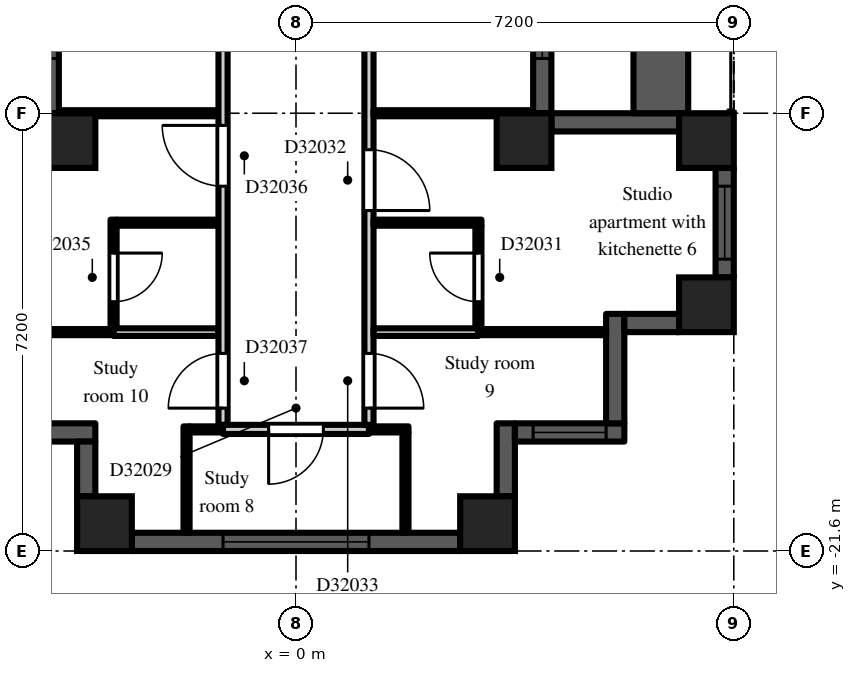
"""IFC4 building model, lengths in metres.
Left out: names, types, materials, properties, quantities, classifications, styles, units other than length and angle.
Written with IfcOpenShell. Run it as: python <this file> out.ifc"""

import sys

from ifc_helpers import new_model, si_unit, direction, frame, frame_2d, origin, origin_2d, place, context, subcontext, project, spatial, rectangle, extrude, element, fill, save


model = new_model("IFC4")
c1 = context("Model", 3, precision=1e-05, world=origin(), true_north=direction((0.0, 1.0)))
c2 = subcontext(c1, "Body", "Model", "MODEL_VIEW")
j1 = project(units=[si_unit("LENGTHUNIT", "METRE"), si_unit("PLANEANGLEUNIT", "RADIAN")], contexts=[c1])
p1 = place(None, origin())
s1 = spatial("IfcSite", under=j1, at=p1, CompositionType="ELEMENT")
p2 = place(p1, origin())
s2 = spatial("IfcBuilding", under=s1, at=p2, CompositionType="ELEMENT")
p3 = place(p2, frame((0.0, 0.0, 225.9)))
s3 = spatial("IfcBuildingStorey", under=s2, at=p3, CompositionType="ELEMENT", Elevation=225.9)
for number, where, z_axis, x_axis in (
    (1, (-3.75, -14.85, 0.0), (0.0, 0.0, 1.0), (1.0, 0.0, 0.0)),
    (2, (-3.15, -21.15, 0.0), (0.0, 0.0, 1.0), (1.0, 0.0, 0.0)),
    (3, (3.15, -21.15, 0.0), (0.0, 0.0, 1.0), (1.0, 0.0, 0.0)),
    (4, (3.75, -14.85, 0.0), (0.0, 0.0, 1.0), (1.0, 0.0, 0.0)),
    (5, (6.75, -17.55, 0.0), (0.0, 0.0, 1.0), (1.0, 0.0, 0.0)),
    (6, (6.75, -14.85, 0.0), (0.0, 0.0, 1.0), (1.0, 0.0, 0.0)),
):
    element("IfcColumn", number, at=place(p3, frame(where, z_axis=z_axis, x_axis=x_axis)), inside=s3, PredefinedType="COLUMN", context=c2, shape_type="SweptSolid", body=[
        extrude(rectangle(XDim=0.9, YDim=0.9, at=origin_2d()), origin(), (0.0, 0.0, 1.0), 3.0),
    ])
p4 = place(p3, frame((-4.05, -7.2, 0.0), z_axis=(0.0, 0.0, 1.0), x_axis=(0.0, -1.0, 0.0)))
e7 = element("IfcWall", 7, at=p4, inside=s3, PredefinedType="SOLIDWALL", context=c2, shape_type="SweptSolid", body=[
    extrude(rectangle(XDim=7.2, YDim=0.3, at=frame_2d((3.6, 0.0))), origin(), (0.0, 0.0, 1.0), 2.3),
])
p5 = place(p4, frame((3.0, 0.0, 0.0)))
e8 = element("IfcOpeningElement", 8, at=p5, cuts=e7, PredefinedType="OPENING", context=c2, shape_type="SweptSolid", body=[
    extrude(rectangle(XDim=1.2, YDim=2.05, at=frame_2d((0.6, 1.025))), frame((0.0, 0.16, 0.0), z_axis=(0.0, -1.0, 0.0), x_axis=(1.0, 0.0, 0.0)), (0.0, 0.0, 1.0), 0.32),
])
p6 = place(p4, frame((0.9, 0.0, 0.2)))
e9 = element("IfcOpeningElement", 9, at=p6, cuts=e7, PredefinedType="OPENING", context=c2, shape_type="SweptSolid", body=[
    extrude(rectangle(XDim=1.8, YDim=1.85, at=frame_2d((0.9, 0.925))), frame((0.0, 0.16, 0.0), z_axis=(0.0, -1.0, 0.0), x_axis=(1.0, 0.0, 0.0)), (0.0, 0.0, 1.0), 0.32),
])
p7 = place(p4, frame((4.5, 0.0, 0.2)))
e10 = element("IfcOpeningElement", 10, at=p7, cuts=e7, PredefinedType="OPENING", context=c2, shape_type="SweptSolid", body=[
    extrude(rectangle(XDim=1.8, YDim=1.85, at=frame_2d((0.9, 0.925))), frame((0.0, 0.16, 0.0), z_axis=(0.0, -1.0, 0.0), x_axis=(1.0, 0.0, 0.0)), (0.0, 0.0, 1.0), 0.32),
])
p8 = place(p3, frame((-5.1, -19.65, 0.0), z_axis=(0.0, 0.0, 1.0), x_axis=(1.0, 0.0, 0.0)))
e11 = element("IfcWall", 11, at=p8, inside=s3, PredefinedType="SOLIDWALL", context=c2, shape_type="SweptSolid", body=[
    extrude(rectangle(XDim=1.8, YDim=0.3, at=frame_2d((0.9, 0.0))), origin(), (0.0, 0.0, 1.0), 2.6),
])
p9 = place(p3, frame((-3.45, -19.8, 0.0), z_axis=(0.0, 0.0, 1.0), x_axis=(0.0, -1.0, 0.0)))
e12 = element("IfcWall", 12, at=p9, inside=s3, PredefinedType="SOLIDWALL", context=c2, shape_type="SweptSolid", body=[
    extrude(rectangle(XDim=0.9, YDim=0.3, at=frame_2d((0.45, 0.0))), origin(), (0.0, 0.0, 1.0), 2.6),
])
p10 = place(p3, frame((-2.7, -21.45, 0.0), z_axis=(0.0, 0.0, 1.0), x_axis=(1.0, 0.0, 0.0)))
e13 = element("IfcWall", 13, at=p10, inside=s3, PredefinedType="SOLIDWALL", context=c2, shape_type="SweptSolid", body=[
    extrude(rectangle(XDim=5.4, YDim=0.3, at=frame_2d((2.7, 0.0))), origin(), (0.0, 0.0, 1.0), 2.3),
])
p11 = place(p10, frame((1.5, 0.0, 0.2)))
e14 = element("IfcOpeningElement", 14, at=p11, cuts=e13, PredefinedType="OPENING", context=c2, shape_type="SweptSolid", body=[
    extrude(rectangle(XDim=2.4, YDim=1.85, at=frame_2d((1.2, 0.925))), frame((0.0, 0.16, 0.0), z_axis=(0.0, -1.0, 0.0), x_axis=(1.0, 0.0, 0.0)), (0.0, 0.0, 1.0), 0.32),
])
p12 = place(p3, frame((3.45, -20.7, 0.0), z_axis=(0.0, 0.0, 1.0), x_axis=(0.0, 1.0, 0.0)))
e15 = element("IfcWall", 15, at=p12, inside=s3, PredefinedType="SOLIDWALL", context=c2, shape_type="SweptSolid", body=[
    extrude(rectangle(XDim=1.2, YDim=0.3, at=frame_2d((0.6, 0.0))), origin(), (0.0, 0.0, 1.0), 2.6),
])
p13 = place(p3, frame((3.6, -19.65, 0.0), z_axis=(0.0, 0.0, 1.0), x_axis=(1.0, 0.0, 0.0)))
e16 = element("IfcWall", 16, at=p13, inside=s3, PredefinedType="SOLIDWALL", context=c2, shape_type="SweptSolid", body=[
    extrude(rectangle(XDim=1.8, YDim=0.3, at=frame_2d((0.9, 0.0))), origin(), (0.0, 0.0, 1.0), 2.6),
])
p14 = place(p13, frame((0.3, 0.0, 0.2)))
e17 = element("IfcOpeningElement", 17, at=p14, cuts=e16, PredefinedType="OPENING", context=c2, shape_type="SweptSolid", body=[
    extrude(rectangle(XDim=1.2, YDim=1.85, at=frame_2d((0.6, 0.925))), frame((0.0, 0.16, 0.0), z_axis=(0.0, -1.0, 0.0), x_axis=(1.0, 0.0, 0.0)), (0.0, 0.0, 1.0), 0.32),
])
p15 = place(p3, frame((5.25, -19.5, 0.0), z_axis=(0.0, 0.0, 1.0), x_axis=(0.0, 1.0, 0.0)))
e18 = element("IfcWall", 18, at=p15, inside=s3, PredefinedType="SOLIDWALL", context=c2, shape_type="SweptSolid", body=[
    extrude(rectangle(XDim=1.8, YDim=0.3, at=frame_2d((0.9, 0.0))), origin(), (0.0, 0.0, 1.0), 2.6),
])
p16 = place(p3, frame((5.4, -17.85, 0.0), z_axis=(0.0, 0.0, 1.0), x_axis=(1.0, 0.0, 0.0)))
e19 = element("IfcWall", 19, at=p16, inside=s3, PredefinedType="SOLIDWALL", context=c2, shape_type="SweptSolid", body=[
    extrude(rectangle(XDim=0.9, YDim=0.3, at=frame_2d((0.45, 0.0))), origin(), (0.0, 0.0, 1.0), 2.6),
])
p17 = place(p3, frame((7.05, -17.1, 0.0), z_axis=(0.0, 0.0, 1.0), x_axis=(0.0, 1.0, 0.0)))
e20 = element("IfcWall", 20, at=p17, inside=s3, PredefinedType="SOLIDWALL", context=c2, shape_type="SweptSolid", body=[
    extrude(rectangle(XDim=1.8, YDim=0.3, at=frame_2d((0.9, 0.0))), origin(), (0.0, 0.0, 1.0), 2.3),
])
p18 = place(p17, frame((0.3, 0.0, 0.2)))
e21 = element("IfcOpeningElement", 21, at=p18, cuts=e20, PredefinedType="OPENING", context=c2, shape_type="SweptSolid", body=[
    extrude(rectangle(XDim=1.2, YDim=1.85, at=frame_2d((0.6, 0.925))), frame((0.0, 0.16, 0.0), z_axis=(0.0, -1.0, 0.0), x_axis=(1.0, 0.0, 0.0)), (0.0, 0.0, 1.0), 0.32),
])
p19 = place(p3, frame((6.3, -14.55, 0.0), z_axis=(0.0, 0.0, 1.0), x_axis=(-1.0, 0.0, 0.0)))
e22 = element("IfcWall", 22, at=p19, inside=s3, PredefinedType="SOLIDWALL", context=c2, shape_type="SweptSolid", body=[
    extrude(rectangle(XDim=2.1, YDim=0.3, at=frame_2d((1.05, 0.0))), origin(), (0.0, 0.0, 1.0), 2.3),
])
p20 = place(p3, frame((4.05, -14.4, 0.0), z_axis=(0.0, 0.0, 1.0), x_axis=(0.0, 1.0, 0.0)))
e23 = element("IfcWall", 23, at=p20, inside=s3, PredefinedType="SOLIDWALL", context=c2, shape_type="SweptSolid", body=[
    extrude(rectangle(XDim=7.2, YDim=0.3, at=frame_2d((3.6, 0.0))), origin(), (0.0, 0.0, 1.0), 2.3),
])
p21 = place(p20, frame((3.0, 0.0, 0.0)))
e24 = element("IfcOpeningElement", 24, at=p21, cuts=e23, PredefinedType="OPENING", context=c2, shape_type="SweptSolid", body=[
    extrude(rectangle(XDim=1.2, YDim=2.05, at=frame_2d((0.6, 1.025))), frame((0.0, 0.16, 0.0), z_axis=(0.0, -1.0, 0.0), x_axis=(1.0, 0.0, 0.0)), (0.0, 0.0, 1.0), 0.32),
])
p22 = place(p20, frame((0.9, 0.0, 0.2)))
e25 = element("IfcOpeningElement", 25, at=p22, cuts=e23, PredefinedType="OPENING", context=c2, shape_type="SweptSolid", body=[
    extrude(rectangle(XDim=1.8, YDim=1.85, at=frame_2d((0.9, 0.925))), frame((0.0, 0.16, 0.0), z_axis=(0.0, -1.0, 0.0), x_axis=(1.0, 0.0, 0.0)), (0.0, 0.0, 1.0), 0.32),
])
p23 = place(p20, frame((4.5, 0.0, 0.2)))
e26 = element("IfcOpeningElement", 26, at=p23, cuts=e23, PredefinedType="OPENING", context=c2, shape_type="SweptSolid", body=[
    extrude(rectangle(XDim=1.8, YDim=1.85, at=frame_2d((0.9, 0.925))), frame((0.0, 0.16, 0.0), z_axis=(0.0, -1.0, 0.0), x_axis=(1.0, 0.0, 0.0)), (0.0, 0.0, 1.0), 0.32),
])
p24 = place(p3, frame((6.0, -14.4, 0.0), z_axis=(0.0, 0.0, 1.0), x_axis=(0.0, 1.0, 0.0)))
e27 = element("IfcWall", 27, at=p24, inside=s3, PredefinedType="PARAPET", context=c2, shape_type="SweptSolid", body=[
    extrude(rectangle(XDim=7.2, YDim=0.9, at=frame_2d((3.6, 0.0))), origin(), (0.0, 0.0, 1.0), 0.8),
])
p25 = place(p3, frame((-5.1, -18.0, 0.0), z_axis=(0.0, 0.0, 1.0), x_axis=(1.0, 0.0, 0.0)))
e28 = element("IfcWall", 28, at=p25, inside=s3, PredefinedType="PARTITIONING", context=c2, shape_type="SweptSolid", body=[
    extrude(rectangle(XDim=2.1, YDim=0.1, at=frame_2d((1.05, 0.0))), origin(), (0.0, 0.0, 1.0), 2.6),
])
p26 = place(p3, frame((-3.9, -14.4, 0.0), z_axis=(0.0, 0.0, 1.0), x_axis=(1.0, 0.0, 0.0)))
e29 = element("IfcWall", 29, at=p26, inside=s3, PredefinedType="PARTITIONING", context=c2, shape_type="SweptSolid", body=[
    extrude(rectangle(XDim=2.625, YDim=0.1, at=frame_2d((1.312, 0.0))), origin(), (0.0, 0.0, 1.0), 2.6),
])
p27 = place(p3, frame((-3.0, -17.938, 0.0), z_axis=(0.0, 0.0, 1.0), x_axis=(0.0, 1.0, 0.0)))
e30 = element("IfcWall", 30, at=p27, inside=s3, PredefinedType="PARTITIONING", context=c2, shape_type="SweptSolid", body=[
    extrude(rectangle(XDim=1.788, YDim=0.1, at=frame_2d((0.894, 0.0))), origin(), (0.0, 0.0, 1.0), 2.6),
])
p28 = place(p27, frame((0.438, 0.0, 0.0)))
e31 = element("IfcOpeningElement", 31, at=p28, cuts=e30, PredefinedType="OPENING", context=c2, shape_type="SweptSolid", body=[
    extrude(rectangle(XDim=0.8, YDim=2.1, at=frame_2d((0.4, 1.05))), frame((0.0, 0.06, 0.0), z_axis=(0.0, -1.0, 0.0), x_axis=(1.0, 0.0, 0.0)), (0.0, 0.0, 1.0), 0.12),
])
p29 = place(p3, frame((-3.0, -18.0, 0.0), z_axis=(0.0, 0.0, 1.0), x_axis=(1.0, 0.0, 0.0)))
e32 = element("IfcWall", 32, at=p29, inside=s3, PredefinedType="PARTITIONING", context=c2, shape_type="SweptSolid", body=[
    extrude(rectangle(XDim=1.725, YDim=0.125, at=frame_2d((0.863, 0.0))), origin(), (0.0, 0.0, 1.0), 2.6),
])
p30 = place(p3, frame((-2.95, -16.2, 0.0), z_axis=(0.0, 0.0, 1.0), x_axis=(1.0, 0.0, 0.0)))
e33 = element("IfcWall", 33, at=p30, inside=s3, PredefinedType="PARTITIONING", context=c2, shape_type="SweptSolid", body=[
    extrude(rectangle(XDim=1.675, YDim=0.1, at=frame_2d((0.837, 0.0))), origin(), (0.0, 0.0, 1.0), 2.6),
])
p31 = place(p3, frame((-1.8, -21.3, 0.0), z_axis=(0.0, 0.0, 1.0), x_axis=(0.0, 1.0, 0.0)))
e34 = element("IfcWall", 34, at=p31, inside=s3, PredefinedType="PARTITIONING", context=c2, shape_type="SweptSolid", body=[
    extrude(rectangle(XDim=1.75, YDim=0.1, at=frame_2d((0.875, 0.0))), origin(), (0.0, 0.0, 1.0), 2.6),
])
p32 = place(p3, frame((-1.75, -19.6, 0.0), z_axis=(0.0, 0.0, 1.0), x_axis=(1.0, 0.0, 0.0)))
e35 = element("IfcWall", 35, at=p32, inside=s3, PredefinedType="PARTITIONING", context=c2, shape_type="SweptSolid", body=[
    extrude(rectangle(XDim=0.55, YDim=0.1, at=frame_2d((0.275, 0.0))), origin(), (0.0, 0.0, 1.0), 2.6),
])
p33 = place(p3, frame((-1.2, -19.525, 0.0), z_axis=(0.0, 0.0, 1.0), x_axis=(0.0, 1.0, 0.0)))
e36 = element("IfcWall", 36, at=p33, inside=s3, PredefinedType="PARTITIONING", context=c2, shape_type="SweptSolid", body=[
    extrude(rectangle(XDim=18.25, YDim=0.15, at=frame_2d((9.125, 0.0))), origin(), (0.0, 0.0, 1.0), 2.6),
])
p34 = place(p33, frame((14.875, 0.0, 0.0)))
e37 = element("IfcOpeningElement", 37, at=p34, cuts=e36, PredefinedType="OPENING", context=c2, shape_type="SweptSolid", body=[
    extrude(rectangle(XDim=0.9, YDim=2.1, at=frame_2d((0.45, 1.05))), frame((0.0, 0.085, 0.0), z_axis=(0.0, -1.0, 0.0), x_axis=(1.0, 0.0, 0.0)), (0.0, 0.0, 1.0), 0.17),
])
p35 = place(p33, frame((10.075, 0.0, 0.0)))
e38 = element("IfcOpeningElement", 38, at=p35, cuts=e36, PredefinedType="OPENING", context=c2, shape_type="SweptSolid", body=[
    extrude(rectangle(XDim=0.9, YDim=2.1, at=frame_2d((0.45, 1.05))), frame((0.0, 0.085, 0.0), z_axis=(0.0, -1.0, 0.0), x_axis=(1.0, 0.0, 0.0)), (0.0, 0.0, 1.0), 0.17),
])
p36 = place(p33, frame((3.925, 0.0, 0.0)))
e39 = element("IfcOpeningElement", 39, at=p36, cuts=e36, PredefinedType="OPENING", context=c2, shape_type="SweptSolid", body=[
    extrude(rectangle(XDim=1.0, YDim=2.1, at=frame_2d((0.5, 1.05))), frame((0.0, 0.085, 0.0), z_axis=(0.0, -1.0, 0.0), x_axis=(1.0, 0.0, 0.0)), (0.0, 0.0, 1.0), 0.17),
])
p37 = place(p33, frame((0.275, 0.0, 0.0)))
e40 = element("IfcOpeningElement", 40, at=p37, cuts=e36, PredefinedType="OPENING", context=c2, shape_type="SweptSolid", body=[
    extrude(rectangle(XDim=0.9, YDim=2.1, at=frame_2d((0.45, 1.05))), frame((0.0, 0.085, 0.0), z_axis=(0.0, -1.0, 0.0), x_axis=(1.0, 0.0, 0.0)), (0.0, 0.0, 1.0), 0.17),
])
p38 = place(p3, frame((-1.2, -19.6, 0.0), z_axis=(0.0, 0.0, 1.0), x_axis=(1.0, 0.0, 0.0)))
e41 = element("IfcWall", 41, at=p38, inside=s3, PredefinedType="PARTITIONING", context=c2, shape_type="SweptSolid", body=[
    extrude(rectangle(XDim=2.4, YDim=0.15, at=frame_2d((1.2, 0.0))), origin(), (0.0, 0.0, 1.0), 2.6),
])
p39 = place(p38, frame((0.75, 0.0, 0.0)))
e42 = element("IfcOpeningElement", 42, at=p39, cuts=e41, PredefinedType="OPENING", context=c2, shape_type="SweptSolid", body=[
    extrude(rectangle(XDim=0.9, YDim=2.1, at=frame_2d((0.45, 1.05))), frame((0.0, 0.085, 0.0), z_axis=(0.0, -1.0, 0.0), x_axis=(1.0, 0.0, 0.0)), (0.0, 0.0, 1.0), 0.17),
])
p40 = place(p3, frame((1.2, -19.525, 0.0), z_axis=(0.0, 0.0, 1.0), x_axis=(0.0, 1.0, 0.0)))
e43 = element("IfcWall", 43, at=p40, inside=s3, PredefinedType="PARTITIONING", context=c2, shape_type="SweptSolid", body=[
    extrude(rectangle(XDim=18.4, YDim=0.15, at=frame_2d((9.2, 0.0))), origin(), (0.0, 0.0, 1.0), 2.6),
])
p41 = place(p40, frame((14.875, 0.0, 0.0)))
e44 = element("IfcOpeningElement", 44, at=p41, cuts=e43, PredefinedType="OPENING", context=c2, shape_type="SweptSolid", body=[
    extrude(rectangle(XDim=0.9, YDim=2.1, at=frame_2d((0.45, 1.05))), frame((0.0, 0.085, 0.0), z_axis=(0.0, -1.0, 0.0), x_axis=(1.0, 0.0, 0.0)), (0.0, 0.0, 1.0), 0.17),
])
p42 = place(p40, frame((6.475, 0.0, 0.0)))
e45 = element("IfcOpeningElement", 45, at=p42, cuts=e43, PredefinedType="OPENING", context=c2, shape_type="SweptSolid", body=[
    extrude(rectangle(XDim=0.9, YDim=2.1, at=frame_2d((0.45, 1.05))), frame((0.0, 0.085, 0.0), z_axis=(0.0, -1.0, 0.0), x_axis=(1.0, 0.0, 0.0)), (0.0, 0.0, 1.0), 0.17),
])
p43 = place(p40, frame((3.525, 0.0, 0.0)))
e46 = element("IfcOpeningElement", 46, at=p43, cuts=e43, PredefinedType="OPENING", context=c2, shape_type="SweptSolid", body=[
    extrude(rectangle(XDim=1.0, YDim=2.1, at=frame_2d((0.5, 1.05))), frame((0.0, 0.085, 0.0), z_axis=(0.0, -1.0, 0.0), x_axis=(1.0, 0.0, 0.0)), (0.0, 0.0, 1.0), 0.17),
])
p44 = place(p40, frame((0.275, 0.0, 0.0)))
e47 = element("IfcOpeningElement", 47, at=p44, cuts=e43, PredefinedType="OPENING", context=c2, shape_type="SweptSolid", body=[
    extrude(rectangle(XDim=0.9, YDim=2.1, at=frame_2d((0.45, 1.05))), frame((0.0, 0.085, 0.0), z_axis=(0.0, -1.0, 0.0), x_axis=(1.0, 0.0, 0.0)), (0.0, 0.0, 1.0), 0.17),
])
p45 = place(p3, frame((1.2, -19.6, 0.0), z_axis=(0.0, 0.0, 1.0), x_axis=(1.0, 0.0, 0.0)))
e48 = element("IfcWall", 48, at=p45, inside=s3, PredefinedType="PARTITIONING", context=c2, shape_type="SweptSolid", body=[
    extrude(rectangle(XDim=0.65, YDim=0.1, at=frame_2d((0.325, 0.0))), origin(), (0.0, 0.0, 1.0), 2.6),
])
p46 = place(p3, frame((1.275, -18.0, 0.0), z_axis=(0.0, 0.0, 1.0), x_axis=(1.0, 0.0, 0.0)))
e49 = element("IfcWall", 49, at=p46, inside=s3, PredefinedType="PARTITIONING", context=c2, shape_type="SweptSolid", body=[
    extrude(rectangle(XDim=1.725, YDim=0.125, at=frame_2d((0.863, 0.0))), origin(), (0.0, 0.0, 1.0), 2.6),
])
p47 = place(p3, frame((1.275, -16.2, 0.0), z_axis=(0.0, 0.0, 1.0), x_axis=(1.0, 0.0, 0.0)))
e50 = element("IfcWall", 50, at=p47, inside=s3, PredefinedType="PARTITIONING", context=c2, shape_type="SweptSolid", body=[
    extrude(rectangle(XDim=1.775, YDim=0.1, at=frame_2d((0.888, 0.0))), origin(), (0.0, 0.0, 1.0), 2.6),
])
p48 = place(p3, frame((1.275, -14.4, 0.0), z_axis=(0.0, 0.0, 1.0), x_axis=(1.0, 0.0, 0.0)))
e51 = element("IfcWall", 51, at=p48, inside=s3, PredefinedType="PARTITIONING", context=c2, shape_type="SweptSolid", body=[
    extrude(rectangle(XDim=2.625, YDim=0.1, at=frame_2d((1.312, 0.0))), origin(), (0.0, 0.0, 1.0), 2.6),
])
p49 = place(p3, frame((1.8, -21.3, 0.0), z_axis=(0.0, 0.0, 1.0), x_axis=(0.0, 1.0, 0.0)))
e52 = element("IfcWall", 52, at=p49, inside=s3, PredefinedType="PARTITIONING", context=c2, shape_type="SweptSolid", body=[
    extrude(rectangle(XDim=1.65, YDim=0.1, at=frame_2d((0.825, 0.0))), origin(), (0.0, 0.0, 1.0), 2.6),
])
p50 = place(p3, frame((3.0, -17.938, 0.0), z_axis=(0.0, 0.0, 1.0), x_axis=(0.0, 1.0, 0.0)))
e53 = element("IfcWall", 53, at=p50, inside=s3, PredefinedType="PARTITIONING", context=c2, shape_type="SweptSolid", body=[
    extrude(rectangle(XDim=1.688, YDim=0.1, at=frame_2d((0.844, 0.0))), origin(), (0.0, 0.0, 1.0), 2.6),
])
p51 = place(p50, frame((0.438, 0.0, 0.0)))
e54 = element("IfcOpeningElement", 54, at=p51, cuts=e53, PredefinedType="OPENING", context=c2, shape_type="SweptSolid", body=[
    extrude(rectangle(XDim=0.8, YDim=2.1, at=frame_2d((0.4, 1.05))), frame((0.0, 0.06, 0.0), z_axis=(0.0, -1.0, 0.0), x_axis=(1.0, 0.0, 0.0)), (0.0, 0.0, 1.0), 0.12),
])
p52 = place(p3, frame((3.0, -18.0, 0.0), z_axis=(0.0, 0.0, 1.0), x_axis=(1.0, 0.0, 0.0)))
e55 = element("IfcWall", 55, at=p52, inside=s3, PredefinedType="PARTITIONING", context=c2, shape_type="SweptSolid", body=[
    extrude(rectangle(XDim=2.1, YDim=0.1, at=frame_2d((1.05, 0.0))), origin(), (0.0, 0.0, 1.0), 2.6),
])
p53 = place(p11, origin())
e56 = element("IfcWindow", 56, at=p53, inside=s3, PartitioningType="SINGLE_PANEL", PredefinedType="WINDOW", context=c2, shape_type="SweptSolid", body=[
    extrude(rectangle(XDim=2.4, YDim=1.85, at=frame_2d((1.2, 0.925))), frame((0.0, 0.03, 0.0), z_axis=(0.0, -1.0, 0.0), x_axis=(1.0, 0.0, 0.0)), (0.0, 0.0, 1.0), 0.06),
])
fill(e14, e56)
p54 = place(p14, origin())
e57 = element("IfcWindow", 57, at=p54, inside=s3, PartitioningType="SINGLE_PANEL", PredefinedType="WINDOW", context=c2, shape_type="SweptSolid", body=[
    extrude(rectangle(XDim=1.2, YDim=1.85, at=frame_2d((0.6, 0.925))), frame((0.0, 0.03, 0.0), z_axis=(0.0, -1.0, 0.0), x_axis=(1.0, 0.0, 0.0)), (0.0, 0.0, 1.0), 0.06),
])
fill(e17, e57)
p55 = place(p18, origin())
e58 = element("IfcWindow", 58, at=p55, inside=s3, PartitioningType="SINGLE_PANEL", PredefinedType="WINDOW", context=c2, shape_type="SweptSolid", body=[
    extrude(rectangle(XDim=1.2, YDim=1.85, at=frame_2d((0.6, 0.925))), frame((0.0, 0.03, 0.0), z_axis=(0.0, -1.0, 0.0), x_axis=(1.0, 0.0, 0.0)), (0.0, 0.0, 1.0), 0.06),
])
fill(e21, e58)
p56 = place(p22, origin())
e59 = element("IfcWindow", 59, at=p56, inside=s3, PartitioningType="SINGLE_PANEL", PredefinedType="WINDOW", context=c2, shape_type="SweptSolid", body=[
    extrude(rectangle(XDim=1.8, YDim=1.85, at=frame_2d((0.9, 0.925))), frame((0.0, 0.03, 0.0), z_axis=(0.0, -1.0, 0.0), x_axis=(1.0, 0.0, 0.0)), (0.0, 0.0, 1.0), 0.06),
])
fill(e25, e59)
p57 = place(p39, frame((0.9, 0.0, 0.0), z_axis=(0.0, 0.0, 1.0), x_axis=(-1.0, 0.0, 0.0)))
e60 = element("IfcDoor", 60, at=p57, inside=s3, OperationType="SINGLE_SWING_RIGHT", PredefinedType="DOOR", context=c2, shape_type="SweptSolid", body=[
    extrude(rectangle(XDim=0.9, YDim=2.1, at=frame_2d((0.45, 1.05))), frame((0.0, 0.025, 0.0), z_axis=(0.0, -1.0, 0.0), x_axis=(1.0, 0.0, 0.0)), (0.0, 0.0, 1.0), 0.05),
])
fill(e42, e60)
p58 = place(p51, origin())
e61 = element("IfcDoor", 61, at=p58, inside=s3, OperationType="SINGLE_SWING_RIGHT", PredefinedType="DOOR", context=c2, shape_type="SweptSolid", body=[
    extrude(rectangle(XDim=0.8, YDim=2.1, at=frame_2d((0.4, 1.05))), frame((0.0, 0.025, 0.0), z_axis=(0.0, -1.0, 0.0), x_axis=(1.0, 0.0, 0.0)), (0.0, 0.0, 1.0), 0.05),
])
fill(e54, e61)
p59 = place(p43, frame((1.0, 0.0, 0.0), z_axis=(0.0, 0.0, 1.0), x_axis=(-1.0, 0.0, 0.0)))
e62 = element("IfcDoor", 62, at=p59, inside=s3, OperationType="SINGLE_SWING_RIGHT", PredefinedType="DOOR", context=c2, shape_type="SweptSolid", body=[
    extrude(rectangle(XDim=1.0, YDim=2.1, at=frame_2d((0.5, 1.05))), frame((0.0, 0.025, 0.0), z_axis=(0.0, -1.0, 0.0), x_axis=(1.0, 0.0, 0.0)), (0.0, 0.0, 1.0), 0.05),
])
fill(e46, e62)
p60 = place(p44, frame((0.9, 0.0, 0.0), z_axis=(0.0, 0.0, 1.0), x_axis=(-1.0, 0.0, 0.0)))
e63 = element("IfcDoor", 63, at=p60, inside=s3, OperationType="SINGLE_SWING_RIGHT", PredefinedType="DOOR", context=c2, shape_type="SweptSolid", body=[
    extrude(rectangle(XDim=0.9, YDim=2.1, at=frame_2d((0.45, 1.05))), frame((0.0, 0.025, 0.0), z_axis=(0.0, -1.0, 0.0), x_axis=(1.0, 0.0, 0.0)), (0.0, 0.0, 1.0), 0.05),
])
fill(e47, e63)
p61 = place(p28, frame((0.8, 0.0, 0.0), z_axis=(0.0, 0.0, 1.0), x_axis=(-1.0, 0.0, 0.0)))
e64 = element("IfcDoor", 64, at=p61, inside=s3, OperationType="SINGLE_SWING_LEFT", PredefinedType="DOOR", context=c2, shape_type="SweptSolid", body=[
    extrude(rectangle(XDim=0.8, YDim=2.1, at=frame_2d((0.4, 1.05))), frame((0.0, 0.025, 0.0), z_axis=(0.0, -1.0, 0.0), x_axis=(1.0, 0.0, 0.0)), (0.0, 0.0, 1.0), 0.05),
])
fill(e31, e64)
p62 = place(p36, origin())
e65 = element("IfcDoor", 65, at=p62, inside=s3, OperationType="SINGLE_SWING_RIGHT", PredefinedType="DOOR", context=c2, shape_type="SweptSolid", body=[
    extrude(rectangle(XDim=1.0, YDim=2.1, at=frame_2d((0.5, 1.05))), frame((0.0, 0.025, 0.0), z_axis=(0.0, -1.0, 0.0), x_axis=(1.0, 0.0, 0.0)), (0.0, 0.0, 1.0), 0.05),
])
fill(e39, e65)
p63 = place(p37, origin())
e66 = element("IfcDoor", 66, at=p63, inside=s3, OperationType="SINGLE_SWING_LEFT", PredefinedType="DOOR", context=c2, shape_type="SweptSolid", body=[
    extrude(rectangle(XDim=0.9, YDim=2.1, at=frame_2d((0.45, 1.05))), frame((0.0, 0.025, 0.0), z_axis=(0.0, -1.0, 0.0), x_axis=(1.0, 0.0, 0.0)), (0.0, 0.0, 1.0), 0.05),
])
fill(e40, e66)
save(model, sys.argv[1])
